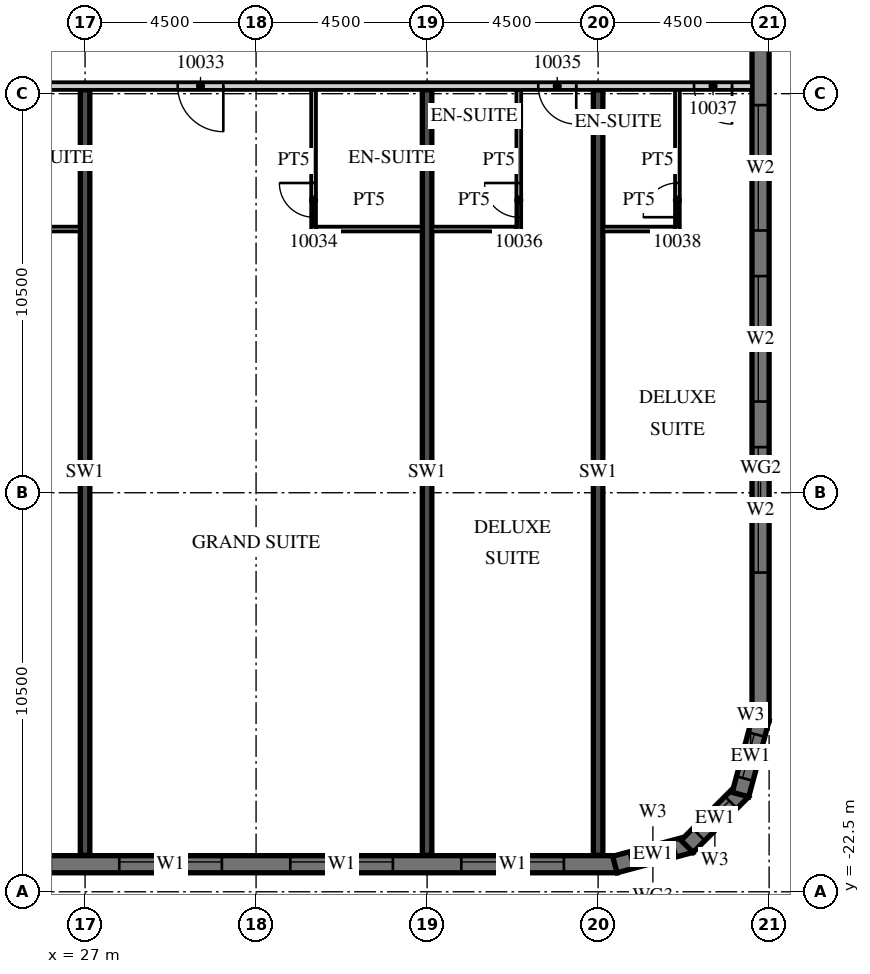
"""IFC4 building model, lengths in metres.
Left out: names, types, materials, properties, quantities, classifications, styles, units other than length and angle.
Written with IfcOpenShell. Run it as: python <this file> out.ifc"""

import sys

from ifc_helpers import new_model, si_unit, direction, frame, frame_2d, origin, place, context, subcontext, project, spatial, polyline, rectangle, outline, extrude, element, fill, save


model = new_model("IFC4")
c1 = context("Model", 3, precision=1e-05, world=origin(), true_north=direction((0.0, 1.0)))
c2 = subcontext(c1, "Body", "Model", "MODEL_VIEW")
j1 = project(units=[si_unit("LENGTHUNIT", "METRE"), si_unit("PLANEANGLEUNIT", "RADIAN")], contexts=[c1])
p1 = place(None, origin())
s1 = spatial("IfcSite", under=j1, at=p1, CompositionType="ELEMENT")
p2 = place(p1, origin())
s2 = spatial("IfcBuilding", under=s1, at=p2, CompositionType="ELEMENT")
p3 = place(p2, frame((0.0, 0.0, 63.3)))
s3 = spatial("IfcBuildingStorey", under=s2, at=p3, CompositionType="ELEMENT", Elevation=63.3)
for number, where, z_axis, x_axis in (
    (1, (27.0, -21.54, 0.0), (0.0, 0.0, 1.0), (0.0, 1.0, 0.0)),
    (2, (36.0, -21.54, 0.0), (0.0, 0.0, 1.0), (0.0, 1.0, 0.0)),
    (3, (40.5, -21.54, 0.0), (0.0, 0.0, 1.0), (0.0, 1.0, 0.0)),
):
    element("IfcWall", number, at=place(p3, frame(where, z_axis=z_axis, x_axis=x_axis)), inside=s3, PredefinedType="SHEAR", context=c2, shape_type="SweptSolid", body=[
        extrude(rectangle(XDim=20.14, YDim=0.25, at=frame_2d((10.07, 0.0))), origin(), (0.0, 0.0, 1.0), 3.3),
    ])
p4 = place(p3, frame((-13.5, -21.775, 0.0), z_axis=(0.0, 0.0, 1.0), x_axis=(1.0, 0.0, 0.0)))
e4 = element("IfcWall", 4, at=p4, inside=s3, PredefinedType="SOLIDWALL", context=c2, shape_type="SweptSolid", body=[
    extrude(rectangle(XDim=54.5, YDim=0.45, at=frame_2d((27.25, 0.0))), origin(), (0.0, 0.0, 1.0), 3.02),
])
p5 = place(p4, frame((0.9, 0.0, 0.45)))
e5 = element("IfcOpeningElement", 5, at=p5, cuts=e4, PredefinedType="OPENING", context=c2, shape_type="SweptSolid", body=[
    extrude(rectangle(XDim=2.7, YDim=2.25, at=frame_2d((1.35, 1.125))), frame((0.0, 0.235, 0.0), z_axis=(0.0, -1.0, 0.0), x_axis=(1.0, 0.0, 0.0)), (0.0, 0.0, 1.0), 0.47),
])
p6 = place(p4, frame((5.4, 0.0, 0.45)))
e6 = element("IfcOpeningElement", 6, at=p6, cuts=e4, PredefinedType="OPENING", context=c2, shape_type="SweptSolid", body=[
    extrude(rectangle(XDim=2.7, YDim=2.25, at=frame_2d((1.35, 1.125))), frame((0.0, 0.235, 0.0), z_axis=(0.0, -1.0, 0.0), x_axis=(1.0, 0.0, 0.0)), (0.0, 0.0, 1.0), 0.47),
])
p7 = place(p4, frame((9.9, 0.0, 0.45)))
e7 = element("IfcOpeningElement", 7, at=p7, cuts=e4, PredefinedType="OPENING", context=c2, shape_type="SweptSolid", body=[
    extrude(rectangle(XDim=2.7, YDim=2.25, at=frame_2d((1.35, 1.125))), frame((0.0, 0.235, 0.0), z_axis=(0.0, -1.0, 0.0), x_axis=(1.0, 0.0, 0.0)), (0.0, 0.0, 1.0), 0.47),
])
p8 = place(p4, frame((14.4, 0.0, 0.45)))
e8 = element("IfcOpeningElement", 8, at=p8, cuts=e4, PredefinedType="OPENING", context=c2, shape_type="SweptSolid", body=[
    extrude(rectangle(XDim=2.7, YDim=2.25, at=frame_2d((1.35, 1.125))), frame((0.0, 0.235, 0.0), z_axis=(0.0, -1.0, 0.0), x_axis=(1.0, 0.0, 0.0)), (0.0, 0.0, 1.0), 0.47),
])
p9 = place(p4, frame((18.9, 0.0, 0.45)))
e9 = element("IfcOpeningElement", 9, at=p9, cuts=e4, PredefinedType="OPENING", context=c2, shape_type="SweptSolid", body=[
    extrude(rectangle(XDim=2.7, YDim=2.25, at=frame_2d((1.35, 1.125))), frame((0.0, 0.235, 0.0), z_axis=(0.0, -1.0, 0.0), x_axis=(1.0, 0.0, 0.0)), (0.0, 0.0, 1.0), 0.47),
])
p10 = place(p4, frame((23.4, 0.0, 0.45)))
e10 = element("IfcOpeningElement", 10, at=p10, cuts=e4, PredefinedType="OPENING", context=c2, shape_type="SweptSolid", body=[
    extrude(rectangle(XDim=2.7, YDim=2.25, at=frame_2d((1.35, 1.125))), frame((0.0, 0.235, 0.0), z_axis=(0.0, -1.0, 0.0), x_axis=(1.0, 0.0, 0.0)), (0.0, 0.0, 1.0), 0.47),
])
p11 = place(p4, frame((27.9, 0.0, 0.45)))
e11 = element("IfcOpeningElement", 11, at=p11, cuts=e4, PredefinedType="OPENING", context=c2, shape_type="SweptSolid", body=[
    extrude(rectangle(XDim=2.7, YDim=2.25, at=frame_2d((1.35, 1.125))), frame((0.0, 0.235, 0.0), z_axis=(0.0, -1.0, 0.0), x_axis=(1.0, 0.0, 0.0)), (0.0, 0.0, 1.0), 0.47),
])
p12 = place(p4, frame((32.4, 0.0, 0.45)))
e12 = element("IfcOpeningElement", 12, at=p12, cuts=e4, PredefinedType="OPENING", context=c2, shape_type="SweptSolid", body=[
    extrude(rectangle(XDim=2.7, YDim=2.25, at=frame_2d((1.35, 1.125))), frame((0.0, 0.235, 0.0), z_axis=(0.0, -1.0, 0.0), x_axis=(1.0, 0.0, 0.0)), (0.0, 0.0, 1.0), 0.47),
])
p13 = place(p4, frame((36.9, 0.0, 0.45)))
e13 = element("IfcOpeningElement", 13, at=p13, cuts=e4, PredefinedType="OPENING", context=c2, shape_type="SweptSolid", body=[
    extrude(rectangle(XDim=2.7, YDim=2.25, at=frame_2d((1.35, 1.125))), frame((0.0, 0.235, 0.0), z_axis=(0.0, -1.0, 0.0), x_axis=(1.0, 0.0, 0.0)), (0.0, 0.0, 1.0), 0.47),
])
p14 = place(p4, frame((41.4, 0.0, 0.45)))
e14 = element("IfcOpeningElement", 14, at=p14, cuts=e4, PredefinedType="OPENING", context=c2, shape_type="SweptSolid", body=[
    extrude(rectangle(XDim=2.7, YDim=2.25, at=frame_2d((1.35, 1.125))), frame((0.0, 0.235, 0.0), z_axis=(0.0, -1.0, 0.0), x_axis=(1.0, 0.0, 0.0)), (0.0, 0.0, 1.0), 0.47),
])
p15 = place(p4, frame((45.9, 0.0, 0.45)))
e15 = element("IfcOpeningElement", 15, at=p15, cuts=e4, PredefinedType="OPENING", context=c2, shape_type="SweptSolid", body=[
    extrude(rectangle(XDim=2.7, YDim=2.25, at=frame_2d((1.35, 1.125))), frame((0.0, 0.235, 0.0), z_axis=(0.0, -1.0, 0.0), x_axis=(1.0, 0.0, 0.0)), (0.0, 0.0, 1.0), 0.47),
])
p16 = place(p4, frame((50.4, 0.0, 0.45)))
e16 = element("IfcOpeningElement", 16, at=p16, cuts=e4, PredefinedType="OPENING", context=c2, shape_type="SweptSolid", body=[
    extrude(rectangle(XDim=2.7, YDim=2.25, at=frame_2d((1.35, 1.125))), frame((0.0, 0.235, 0.0), z_axis=(0.0, -1.0, 0.0), x_axis=(1.0, 0.0, 0.0)), (0.0, 0.0, 1.0), 0.47),
])
p17 = place(p3, frame((40.942, -21.783, 0.0), z_axis=(0.0, 0.0, 1.0), x_axis=(0.965926999034, 0.25881466832, 0.0)))
e17 = element("IfcWall", 17, at=p17, inside=s3, PredefinedType="SOLIDWALL", context=c2, shape_type="SweptSolid", body=[
    extrude(outline(polyline([(0.0, -0.225), (2.071, -0.225), (1.95, 0.225), (0.121, 0.225), (0.0, -0.225)])), origin(), (0.0, 0.0, 1.0), 3.02),
])
p18 = place(p17, frame((0.435, 0.0, 0.45)))
e18 = element("IfcOpeningElement", 18, at=p18, cuts=e17, PredefinedType="OPENING", context=c2, shape_type="SweptSolid", body=[
    extrude(rectangle(XDim=1.2, YDim=2.25, at=frame_2d((0.6, 1.125))), frame((0.0, 0.235, 0.0), z_axis=(0.0, -1.0, 0.0), x_axis=(1.0, 0.0, 0.0)), (0.0, 0.0, 1.0), 0.47),
])
p19 = place(p3, frame((42.841, -21.305, 0.0), z_axis=(0.0, 0.0, 1.0), x_axis=(0.707106781187, 0.707106781187, 0.0)))
e19 = element("IfcWall", 19, at=p19, inside=s3, PredefinedType="SOLIDWALL", context=c2, shape_type="SweptSolid", body=[
    extrude(outline(polyline([(0.0, -0.225), (2.071, -0.225), (1.95, 0.225), (0.121, 0.225), (0.0, -0.225)])), origin(), (0.0, 0.0, 1.0), 3.02),
])
p20 = place(p19, frame((0.435, 0.0, 0.45)))
e20 = element("IfcOpeningElement", 20, at=p20, cuts=e19, PredefinedType="OPENING", context=c2, shape_type="SweptSolid", body=[
    extrude(rectangle(XDim=1.2, YDim=2.25, at=frame_2d((0.6, 1.125))), frame((0.0, 0.235, 0.0), z_axis=(0.0, -1.0, 0.0), x_axis=(1.0, 0.0, 0.0)), (0.0, 0.0, 1.0), 0.47),
])
p21 = place(p3, frame((44.247, -19.942, 0.0), z_axis=(0.0, 0.0, 1.0), x_axis=(0.25881466832, 0.965926999034, 0.0)))
e21 = element("IfcWall", 21, at=p21, inside=s3, PredefinedType="SOLIDWALL", context=c2, shape_type="SweptSolid", body=[
    extrude(outline(polyline([(-0.0, -0.225), (2.07, -0.225), (1.95, 0.225), (0.12, 0.225), (-0.0, -0.225)])), origin(), (0.0, 0.0, 1.0), 3.02),
])
p22 = place(p21, frame((0.435, 0.0, 0.45)))
e22 = element("IfcOpeningElement", 22, at=p22, cuts=e21, PredefinedType="OPENING", context=c2, shape_type="SweptSolid", body=[
    extrude(rectangle(XDim=1.2, YDim=2.25, at=frame_2d((0.6, 1.125))), frame((0.0, 0.235, 0.0), z_axis=(0.0, -1.0, 0.0), x_axis=(1.0, 0.0, 0.0)), (0.0, 0.0, 1.0), 0.47),
])
p23 = place(p3, frame((44.775, -18.0, 0.0), z_axis=(0.0, 0.0, 1.0), x_axis=(0.0, 1.0, 0.0)))
e23 = element("IfcWall", 23, at=p23, inside=s3, PredefinedType="SOLIDWALL", context=c2, shape_type="SweptSolid", body=[
    extrude(rectangle(XDim=36.0, YDim=0.45, at=frame_2d((18.0, 0.0))), origin(), (0.0, 0.0, 1.0), 3.02),
])
p24 = place(p23, frame((3.9, 0.0, 0.45)))
e24 = element("IfcOpeningElement", 24, at=p24, cuts=e23, PredefinedType="OPENING", context=c2, shape_type="SweptSolid", body=[
    extrude(rectangle(XDim=3.3, YDim=2.25, at=frame_2d((1.65, 1.125))), frame((0.0, 0.235, 0.0), z_axis=(0.0, -1.0, 0.0), x_axis=(1.0, 0.0, 0.0)), (0.0, 0.0, 1.0), 0.47),
])
p25 = place(p23, frame((8.4, 0.0, 0.45)))
e25 = element("IfcOpeningElement", 25, at=p25, cuts=e23, PredefinedType="OPENING", context=c2, shape_type="SweptSolid", body=[
    extrude(rectangle(XDim=3.3, YDim=2.25, at=frame_2d((1.65, 1.125))), frame((0.0, 0.235, 0.0), z_axis=(0.0, -1.0, 0.0), x_axis=(1.0, 0.0, 0.0)), (0.0, 0.0, 1.0), 0.47),
])
p26 = place(p23, frame((12.9, 0.0, 0.45)))
e26 = element("IfcOpeningElement", 26, at=p26, cuts=e23, PredefinedType="OPENING", context=c2, shape_type="SweptSolid", body=[
    extrude(rectangle(XDim=3.3, YDim=2.25, at=frame_2d((1.65, 1.125))), frame((0.0, 0.235, 0.0), z_axis=(0.0, -1.0, 0.0), x_axis=(1.0, 0.0, 0.0)), (0.0, 0.0, 1.0), 0.47),
])
p27 = place(p3, frame((-13.5, -1.3, 0.0), z_axis=(0.0, 0.0, 1.0), x_axis=(1.0, 0.0, 0.0)))
e27 = element("IfcWall", 27, at=p27, inside=s3, PredefinedType="PARTITIONING", context=c2, shape_type="SweptSolid", body=[
    extrude(rectangle(XDim=58.05, YDim=0.2, at=frame_2d((29.025, 0.0))), origin(), (0.0, 0.0, 1.0), 3.02),
])
p28 = place(p27, frame((2.925, 0.0, 0.0)))
e28 = element("IfcOpeningElement", 28, at=p28, cuts=e27, PredefinedType="OPENING", context=c2, shape_type="SweptSolid", body=[
    extrude(rectangle(XDim=1.0, YDim=2.1, at=frame_2d((0.5, 1.05))), frame((0.0, 0.11, 0.0), z_axis=(0.0, -1.0, 0.0), x_axis=(1.0, 0.0, 0.0)), (0.0, 0.0, 1.0), 0.22),
])
p29 = place(p27, frame((9.863, 0.0, 0.0)))
e29 = element("IfcOpeningElement", 29, at=p29, cuts=e27, PredefinedType="OPENING", context=c2, shape_type="SweptSolid", body=[
    extrude(rectangle(XDim=1.2, YDim=2.1, at=frame_2d((0.6, 1.05))), frame((0.0, 0.11, 0.0), z_axis=(0.0, -1.0, 0.0), x_axis=(1.0, 0.0, 0.0)), (0.0, 0.0, 1.0), 0.22),
])
p30 = place(p27, frame((16.45, 0.0, 0.0)))
e30 = element("IfcOpeningElement", 30, at=p30, cuts=e27, PredefinedType="OPENING", context=c2, shape_type="SweptSolid", body=[
    extrude(rectangle(XDim=1.0, YDim=2.1, at=frame_2d((0.5, 1.05))), frame((0.0, 0.11, 0.0), z_axis=(0.0, -1.0, 0.0), x_axis=(1.0, 0.0, 0.0)), (0.0, 0.0, 1.0), 0.22),
])
p31 = place(p27, frame((18.55, 0.0, 0.0)))
e31 = element("IfcOpeningElement", 31, at=p31, cuts=e27, PredefinedType="OPENING", context=c2, shape_type="SweptSolid", body=[
    extrude(rectangle(XDim=1.0, YDim=2.1, at=frame_2d((0.5, 1.05))), frame((0.0, 0.11, 0.0), z_axis=(0.0, -1.0, 0.0), x_axis=(1.0, 0.0, 0.0)), (0.0, 0.0, 1.0), 0.22),
])
p32 = place(p27, frame((24.938, 0.0, 0.0)))
e32 = element("IfcOpeningElement", 32, at=p32, cuts=e27, PredefinedType="OPENING", context=c2, shape_type="SweptSolid", body=[
    extrude(rectangle(XDim=1.2, YDim=2.1, at=frame_2d((0.6, 1.05))), frame((0.0, 0.11, 0.0), z_axis=(0.0, -1.0, 0.0), x_axis=(1.0, 0.0, 0.0)), (0.0, 0.0, 1.0), 0.22),
])
p33 = place(p27, frame((33.938, 0.0, 0.0)))
e33 = element("IfcOpeningElement", 33, at=p33, cuts=e27, PredefinedType="OPENING", context=c2, shape_type="SweptSolid", body=[
    extrude(rectangle(XDim=1.2, YDim=2.1, at=frame_2d((0.6, 1.05))), frame((0.0, 0.11, 0.0), z_axis=(0.0, -1.0, 0.0), x_axis=(1.0, 0.0, 0.0)), (0.0, 0.0, 1.0), 0.22),
])
p34 = place(p27, frame((42.938, 0.0, 0.0)))
e34 = element("IfcOpeningElement", 34, at=p34, cuts=e27, PredefinedType="OPENING", context=c2, shape_type="SweptSolid", body=[
    extrude(rectangle(XDim=1.2, YDim=2.1, at=frame_2d((0.6, 1.05))), frame((0.0, 0.11, 0.0), z_axis=(0.0, -1.0, 0.0), x_axis=(1.0, 0.0, 0.0)), (0.0, 0.0, 1.0), 0.22),
])
p35 = place(p27, frame((52.425, 0.0, 0.0)))
e35 = element("IfcOpeningElement", 35, at=p35, cuts=e27, PredefinedType="OPENING", context=c2, shape_type="SweptSolid", body=[
    extrude(rectangle(XDim=1.0, YDim=2.1, at=frame_2d((0.5, 1.05))), frame((0.0, 0.11, 0.0), z_axis=(0.0, -1.0, 0.0), x_axis=(1.0, 0.0, 0.0)), (0.0, 0.0, 1.0), 0.22),
])
p36 = place(p27, frame((56.525, 0.0, 0.0)))
e36 = element("IfcOpeningElement", 36, at=p36, cuts=e27, PredefinedType="OPENING", context=c2, shape_type="SweptSolid", body=[
    extrude(rectangle(XDim=1.0, YDim=2.1, at=frame_2d((0.5, 1.05))), frame((0.0, 0.11, 0.0), z_axis=(0.0, -1.0, 0.0), x_axis=(1.0, 0.0, 0.0)), (0.0, 0.0, 1.0), 0.22),
])
p37 = place(p3, frame((24.075, -5.062, 0.0), z_axis=(0.0, 0.0, 1.0), x_axis=(1.0, 0.0, 0.0)))
e37 = element("IfcWall", 37, at=p37, inside=s3, PredefinedType="PARTITIONING", context=c2, shape_type="SweptSolid", body=[
    extrude(rectangle(XDim=2.8, YDim=0.125, at=frame_2d((1.4, 0.0))), origin(), (0.0, 0.0, 1.0), 3.02),
])
p38 = place(p3, frame((33.013, -5.125, 0.0), z_axis=(0.0, 0.0, 1.0), x_axis=(0.0, 1.0, 0.0)))
e38 = element("IfcWall", 38, at=p38, inside=s3, PredefinedType="PARTITIONING", context=c2, shape_type="SweptSolid", body=[
    extrude(rectangle(XDim=3.725, YDim=0.125, at=frame_2d((1.863, 0.0))), origin(), (0.0, 0.0, 1.0), 3.02),
])
p39 = place(p38, frame((0.375, 0.0, 0.0)))
e39 = element("IfcOpeningElement", 39, at=p39, cuts=e38, PredefinedType="OPENING", context=c2, shape_type="SweptSolid", body=[
    extrude(rectangle(XDim=0.9, YDim=2.1, at=frame_2d((0.45, 1.05))), frame((0.0, 0.073, 0.0), z_axis=(0.0, -1.0, 0.0), x_axis=(1.0, 0.0, 0.0)), (0.0, 0.0, 1.0), 0.145),
])
p40 = place(p3, frame((33.075, -5.062, 0.0), z_axis=(0.0, 0.0, 1.0), x_axis=(1.0, 0.0, 0.0)))
e40 = element("IfcWall", 40, at=p40, inside=s3, PredefinedType="PARTITIONING", context=c2, shape_type="SweptSolid", body=[
    extrude(rectangle(XDim=2.8, YDim=0.125, at=frame_2d((1.4, 0.0))), origin(), (0.0, 0.0, 1.0), 3.02),
])
p41 = place(p3, frame((38.413, -5.125, 0.0), z_axis=(0.0, 0.0, 1.0), x_axis=(0.0, 1.0, 0.0)))
e41 = element("IfcWall", 41, at=p41, inside=s3, PredefinedType="PARTITIONING", context=c2, shape_type="SweptSolid", body=[
    extrude(rectangle(XDim=3.725, YDim=0.125, at=frame_2d((1.863, 0.0))), origin(), (0.0, 0.0, 1.0), 3.02),
])
p42 = place(p41, frame((0.375, 0.0, 0.0)))
e42 = element("IfcOpeningElement", 42, at=p42, cuts=e41, PredefinedType="OPENING", context=c2, shape_type="SweptSolid", body=[
    extrude(rectangle(XDim=0.9, YDim=2.1, at=frame_2d((0.45, 1.05))), frame((0.0, 0.073, 0.0), z_axis=(0.0, -1.0, 0.0), x_axis=(1.0, 0.0, 0.0)), (0.0, 0.0, 1.0), 0.145),
])
p43 = place(p3, frame((36.125, -5.062, 0.0), z_axis=(0.0, 0.0, 1.0), x_axis=(1.0, 0.0, 0.0)))
e43 = element("IfcWall", 43, at=p43, inside=s3, PredefinedType="PARTITIONING", context=c2, shape_type="SweptSolid", body=[
    extrude(rectangle(XDim=2.225, YDim=0.125, at=frame_2d((1.113, 0.0))), origin(), (0.0, 0.0, 1.0), 3.02),
])
p44 = place(p3, frame((42.587, -5.125, 0.0), z_axis=(0.0, 0.0, 1.0), x_axis=(0.0, 1.0, 0.0)))
e44 = element("IfcWall", 44, at=p44, inside=s3, PredefinedType="PARTITIONING", context=c2, shape_type="SweptSolid", body=[
    extrude(rectangle(XDim=3.725, YDim=0.125, at=frame_2d((1.863, 0.0))), origin(), (0.0, 0.0, 1.0), 3.02),
])
p45 = place(p44, frame((0.375, 0.0, 0.0)))
e45 = element("IfcOpeningElement", 45, at=p45, cuts=e44, PredefinedType="OPENING", context=c2, shape_type="SweptSolid", body=[
    extrude(rectangle(XDim=0.9, YDim=2.1, at=frame_2d((0.45, 1.05))), frame((0.0, 0.073, 0.0), z_axis=(0.0, -1.0, 0.0), x_axis=(1.0, 0.0, 0.0)), (0.0, 0.0, 1.0), 0.145),
])
p46 = place(p3, frame((40.625, -5.062, 0.0), z_axis=(0.0, 0.0, 1.0), x_axis=(1.0, 0.0, 0.0)))
e46 = element("IfcWall", 46, at=p46, inside=s3, PredefinedType="PARTITIONING", context=c2, shape_type="SweptSolid", body=[
    extrude(rectangle(XDim=1.9, YDim=0.125, at=frame_2d((0.95, 0.0))), origin(), (0.0, 0.0, 1.0), 3.02),
])
p47 = place(p14, origin())
e47 = element("IfcWindow", 47, at=p47, inside=s3, PartitioningType="SINGLE_PANEL", PredefinedType="WINDOW", context=c2, shape_type="SweptSolid", body=[
    extrude(rectangle(XDim=2.7, YDim=2.25, at=frame_2d((1.35, 1.125))), frame((0.0, 0.09, 0.0), z_axis=(0.0, -1.0, 0.0), x_axis=(1.0, 0.0, 0.0)), (0.0, 0.0, 1.0), 0.06),
])
fill(e14, e47)
p48 = place(p15, origin())
e48 = element("IfcWindow", 48, at=p48, inside=s3, PartitioningType="SINGLE_PANEL", PredefinedType="WINDOW", context=c2, shape_type="SweptSolid", body=[
    extrude(rectangle(XDim=2.7, YDim=2.25, at=frame_2d((1.35, 1.125))), frame((0.0, 0.09, 0.0), z_axis=(0.0, -1.0, 0.0), x_axis=(1.0, 0.0, 0.0)), (0.0, 0.0, 1.0), 0.06),
])
fill(e15, e48)
p49 = place(p16, origin())
e49 = element("IfcWindow", 49, at=p49, inside=s3, PartitioningType="SINGLE_PANEL", PredefinedType="WINDOW", context=c2, shape_type="SweptSolid", body=[
    extrude(rectangle(XDim=2.7, YDim=2.25, at=frame_2d((1.35, 1.125))), frame((0.0, 0.09, 0.0), z_axis=(0.0, -1.0, 0.0), x_axis=(1.0, 0.0, 0.0)), (0.0, 0.0, 1.0), 0.06),
])
fill(e16, e49)
p50 = place(p18, origin())
e50 = element("IfcWindow", 50, at=p50, inside=s3, PartitioningType="SINGLE_PANEL", PredefinedType="WINDOW", context=c2, shape_type="SweptSolid", body=[
    extrude(rectangle(XDim=1.2, YDim=2.25, at=frame_2d((0.6, 1.125))), frame((0.0, 0.09, 0.0), z_axis=(0.0, -1.0, 0.0), x_axis=(1.0, 0.0, 0.0)), (0.0, 0.0, 1.0), 0.06),
])
fill(e18, e50)
p51 = place(p20, origin())
e51 = element("IfcWindow", 51, at=p51, inside=s3, PartitioningType="SINGLE_PANEL", PredefinedType="WINDOW", context=c2, shape_type="SweptSolid", body=[
    extrude(rectangle(XDim=1.2, YDim=2.25, at=frame_2d((0.6, 1.125))), frame((0.0, 0.09, 0.0), z_axis=(0.0, -1.0, 0.0), x_axis=(1.0, 0.0, 0.0)), (0.0, 0.0, 1.0), 0.06),
])
fill(e20, e51)
p52 = place(p22, origin())
e52 = element("IfcWindow", 52, at=p52, inside=s3, PartitioningType="SINGLE_PANEL", PredefinedType="WINDOW", context=c2, shape_type="SweptSolid", body=[
    extrude(rectangle(XDim=1.2, YDim=2.25, at=frame_2d((0.6, 1.125))), frame((0.0, 0.09, 0.0), z_axis=(0.0, -1.0, 0.0), x_axis=(1.0, 0.0, 0.0)), (0.0, 0.0, 1.0), 0.06),
])
fill(e22, e52)
p53 = place(p24, origin())
e53 = element("IfcWindow", 53, at=p53, inside=s3, PartitioningType="SINGLE_PANEL", PredefinedType="WINDOW", context=c2, shape_type="SweptSolid", body=[
    extrude(rectangle(XDim=3.3, YDim=2.25, at=frame_2d((1.65, 1.125))), frame((0.0, 0.09, 0.0), z_axis=(0.0, -1.0, 0.0), x_axis=(1.0, 0.0, 0.0)), (0.0, 0.0, 1.0), 0.06),
])
fill(e24, e53)
p54 = place(p25, origin())
e54 = element("IfcWindow", 54, at=p54, inside=s3, PartitioningType="SINGLE_PANEL", PredefinedType="WINDOW", context=c2, shape_type="SweptSolid", body=[
    extrude(rectangle(XDim=3.3, YDim=2.25, at=frame_2d((1.65, 1.125))), frame((0.0, 0.09, 0.0), z_axis=(0.0, -1.0, 0.0), x_axis=(1.0, 0.0, 0.0)), (0.0, 0.0, 1.0), 0.06),
])
fill(e25, e54)
p55 = place(p26, origin())
e55 = element("IfcWindow", 55, at=p55, inside=s3, PartitioningType="SINGLE_PANEL", PredefinedType="WINDOW", context=c2, shape_type="SweptSolid", body=[
    extrude(rectangle(XDim=3.3, YDim=2.25, at=frame_2d((1.65, 1.125))), frame((0.0, 0.09, 0.0), z_axis=(0.0, -1.0, 0.0), x_axis=(1.0, 0.0, 0.0)), (0.0, 0.0, 1.0), 0.06),
])
fill(e26, e55)
p56 = place(p34, origin())
e56 = element("IfcDoor", 56, at=p56, inside=s3, OperationType="SINGLE_SWING_RIGHT", PredefinedType="DOOR", context=c2, shape_type="SweptSolid", body=[
    extrude(rectangle(XDim=1.2, YDim=2.1, at=frame_2d((0.6, 1.05))), frame((0.0, 0.025, 0.0), z_axis=(0.0, -1.0, 0.0), x_axis=(1.0, 0.0, 0.0)), (0.0, 0.0, 1.0), 0.05),
])
fill(e34, e56)
p57 = place(p39, origin())
e57 = element("IfcDoor", 57, at=p57, inside=s3, OperationType="SINGLE_SWING_RIGHT", PredefinedType="DOOR", context=c2, shape_type="SweptSolid", body=[
    extrude(rectangle(XDim=0.9, YDim=2.1, at=frame_2d((0.45, 1.05))), frame((0.0, 0.025, 0.0), z_axis=(0.0, -1.0, 0.0), x_axis=(1.0, 0.0, 0.0)), (0.0, 0.0, 1.0), 0.05),
])
fill(e39, e57)
p58 = place(p35, origin())
e58 = element("IfcDoor", 58, at=p58, inside=s3, OperationType="SINGLE_SWING_RIGHT", PredefinedType="DOOR", context=c2, shape_type="SweptSolid", body=[
    extrude(rectangle(XDim=1.0, YDim=2.1, at=frame_2d((0.5, 1.05))), frame((0.0, 0.025, 0.0), z_axis=(0.0, -1.0, 0.0), x_axis=(1.0, 0.0, 0.0)), (0.0, 0.0, 1.0), 0.05),
])
fill(e35, e58)
p59 = place(p42, origin())
e59 = element("IfcDoor", 59, at=p59, inside=s3, OperationType="SINGLE_SWING_RIGHT", PredefinedType="DOOR", context=c2, shape_type="SweptSolid", body=[
    extrude(rectangle(XDim=0.9, YDim=2.1, at=frame_2d((0.45, 1.05))), frame((0.0, 0.025, 0.0), z_axis=(0.0, -1.0, 0.0), x_axis=(1.0, 0.0, 0.0)), (0.0, 0.0, 1.0), 0.05),
])
fill(e42, e59)
p60 = place(p36, origin())
e60 = element("IfcDoor", 60, at=p60, inside=s3, OperationType="SINGLE_SWING_RIGHT", PredefinedType="DOOR", context=c2, shape_type="SweptSolid", body=[
    extrude(rectangle(XDim=1.0, YDim=2.1, at=frame_2d((0.5, 1.05))), frame((0.0, 0.025, 0.0), z_axis=(0.0, -1.0, 0.0), x_axis=(1.0, 0.0, 0.0)), (0.0, 0.0, 1.0), 0.05),
])
fill(e36, e60)
p61 = place(p45, origin())
e61 = element("IfcDoor", 61, at=p61, inside=s3, OperationType="SINGLE_SWING_LEFT", PredefinedType="DOOR", context=c2, shape_type="SweptSolid", body=[
    extrude(rectangle(XDim=0.9, YDim=2.1, at=frame_2d((0.45, 1.05))), frame((0.0, 0.025, 0.0), z_axis=(0.0, -1.0, 0.0), x_axis=(1.0, 0.0, 0.0)), (0.0, 0.0, 1.0), 0.05),
])
fill(e45, e61)
save(model, sys.argv[1])
